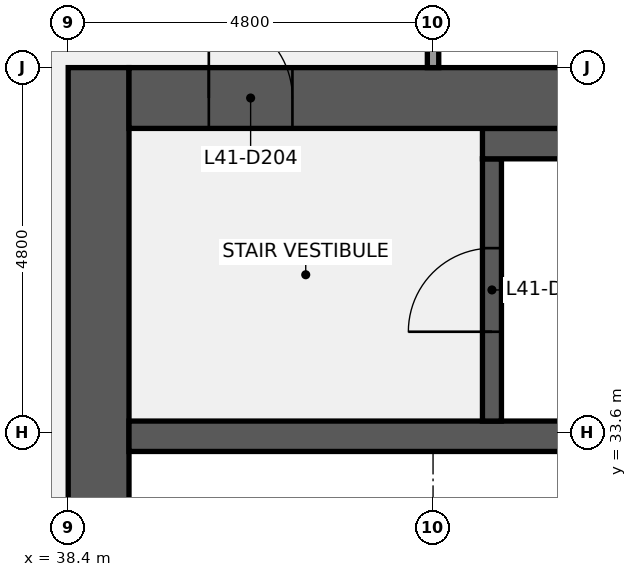
"""IFC4 building model, lengths in metres.
Left out: names, types, materials, properties, quantities, classifications, styles, units other than length and angle.
Written with IfcOpenShell. Run it as: python <this file> out.ifc"""

import sys

from ifc_helpers import new_model, si_unit, direction, frame, frame_2d, origin, place, context, subcontext, project, spatial, rectangle, extrude, element, fill, save


model = new_model("IFC4")
c1 = context("Model", 3, precision=1e-05, world=origin(), true_north=direction((0.0, 1.0)))
c2 = subcontext(c1, "Body", "Model", "MODEL_VIEW")
j1 = project(units=[si_unit("LENGTHUNIT", "METRE"), si_unit("PLANEANGLEUNIT", "RADIAN")], contexts=[c1])
p1 = place(None, origin())
s1 = spatial("IfcSite", under=j1, at=p1, CompositionType="ELEMENT")
p2 = place(p1, origin())
s2 = spatial("IfcBuilding", under=s1, at=p2, CompositionType="ELEMENT")
p3 = place(p2, frame((0.0, 0.0, 193.2)))
s3 = spatial("IfcBuildingStorey", under=s2, at=p3, CompositionType="ELEMENT", Elevation=193.2)
p4 = place(p3, frame((38.8, 9.6, 0.0), z_axis=(0.0, 0.0, 1.0), x_axis=(0.0, 1.0, 0.0)))
e1 = element("IfcWall", 1, at=p4, inside=s3, PredefinedType="SHEAR", context=c2, shape_type="SweptSolid", body=[
    extrude(rectangle(XDim=28.8, YDim=0.8, at=frame_2d((14.4, 0.0))), origin(), (0.0, 0.0, 1.0), 3.84),
])
p5 = place(p4, frame((8.7, 0.0, 0.0)))
e2 = element("IfcOpeningElement", 2, at=p5, cuts=e1, PredefinedType="OPENING", context=c2, shape_type="SweptSolid", body=[
    extrude(rectangle(XDim=1.8, YDim=2.1, at=frame_2d((0.9, 1.05))), frame((0.0, 0.41, 0.0), z_axis=(0.0, -1.0, 0.0), x_axis=(1.0, 0.0, 0.0)), (0.0, 0.0, 1.0), 0.82),
])
p6 = place(p4, frame((18.3, 0.0, 0.0)))
e3 = element("IfcOpeningElement", 3, at=p6, cuts=e1, PredefinedType="OPENING", context=c2, shape_type="SweptSolid", body=[
    extrude(rectangle(XDim=1.8, YDim=2.1, at=frame_2d((0.9, 1.05))), frame((0.0, 0.41, 0.0), z_axis=(0.0, -1.0, 0.0), x_axis=(1.0, 0.0, 0.0)), (0.0, 0.0, 1.0), 0.82),
])
p7 = place(p3, frame((39.2, 33.55, 0.0), z_axis=(0.0, 0.0, 1.0), x_axis=(1.0, 0.0, 0.0)))
e4 = element("IfcWall", 4, at=p7, inside=s3, PredefinedType="SHEAR", context=c2, shape_type="SweptSolid", body=[
    extrude(rectangle(XDim=17.6, YDim=0.4, at=frame_2d((8.8, 0.0))), origin(), (0.0, 0.0, 1.0), 3.84),
])
p8 = place(p3, frame((43.975, 33.75, 0.0), z_axis=(0.0, 0.0, 1.0), x_axis=(0.0, 1.0, 0.0)))
e5 = element("IfcWall", 5, at=p8, inside=s3, PredefinedType="SHEAR", context=c2, shape_type="SweptSolid", body=[
    extrude(rectangle(XDim=3.45, YDim=0.25, at=frame_2d((1.725, 0.0))), origin(), (0.0, 0.0, 1.0), 3.84),
])
p9 = place(p8, frame((1.175, 0.0, 0.0)))
e6 = element("IfcOpeningElement", 6, at=p9, cuts=e5, PredefinedType="OPENING", context=c2, shape_type="SweptSolid", body=[
    extrude(rectangle(XDim=1.1, YDim=2.1, at=frame_2d((0.55, 1.05))), frame((0.0, 0.135, 0.0), z_axis=(0.0, -1.0, 0.0), x_axis=(1.0, 0.0, 0.0)), (0.0, 0.0, 1.0), 0.27),
])
p10 = place(p3, frame((43.85, 37.4, 0.0), z_axis=(0.0, 0.0, 1.0), x_axis=(1.0, 0.0, 0.0)))
e7 = element("IfcWall", 7, at=p10, inside=s3, PredefinedType="SHEAR", context=c2, shape_type="SweptSolid", body=[
    extrude(rectangle(XDim=4.15, YDim=0.4, at=frame_2d((2.075, 0.0))), origin(), (0.0, 0.0, 1.0), 3.84),
])
p11 = place(p3, frame((39.2, 38.0, 0.0), z_axis=(0.0, 0.0, 1.0), x_axis=(1.0, 0.0, 0.0)))
e8 = element("IfcWall", 8, at=p11, inside=s3, PredefinedType="SHEAR", context=c2, shape_type="SweptSolid", body=[
    extrude(rectangle(XDim=8.8, YDim=0.8, at=frame_2d((4.4, 0.0))), origin(), (0.0, 0.0, 1.0), 3.84),
])
p12 = place(p11, frame((1.05, 0.0, 0.0)))
e9 = element("IfcOpeningElement", 9, at=p12, cuts=e8, PredefinedType="OPENING", context=c2, shape_type="SweptSolid", body=[
    extrude(rectangle(XDim=1.1, YDim=2.1, at=frame_2d((0.55, 1.05))), frame((0.0, 0.41, 0.0), z_axis=(0.0, -1.0, 0.0), x_axis=(1.0, 0.0, 0.0)), (0.0, 0.0, 1.0), 0.82),
])
p13 = place(p3, frame((43.2, 38.4, 0.0), z_axis=(0.0, 0.0, 1.0), x_axis=(0.0, 1.0, 0.0)))
e10 = element("IfcWall", 10, at=p13, inside=s3, PredefinedType="PARTITIONING", context=c2, shape_type="SweptSolid", body=[
    extrude(rectangle(XDim=2.325, YDim=0.15, at=frame_2d((1.163, 0.0))), origin(), (0.0, 0.0, 1.0), 2.849),
])
p14 = place(p13, frame((0.663, 0.0, 0.0)))
e11 = element("IfcOpeningElement", 11, at=p14, cuts=e10, PredefinedType="OPENING", context=c2, shape_type="SweptSolid", body=[
    extrude(rectangle(XDim=1.0, YDim=2.1, at=frame_2d((0.5, 1.05))), frame((0.0, 0.085, 0.0), z_axis=(0.0, -1.0, 0.0), x_axis=(1.0, 0.0, 0.0)), (0.0, 0.0, 1.0), 0.17),
])
p15 = place(p9, origin())
e12 = element("IfcDoor", 12, at=p15, inside=s3, OperationType="SINGLE_SWING_LEFT", PredefinedType="DOOR", context=c2, shape_type="SweptSolid", body=[
    extrude(rectangle(XDim=1.1, YDim=2.1, at=frame_2d((0.55, 1.05))), frame((0.0, 0.025, 0.0), z_axis=(0.0, -1.0, 0.0), x_axis=(1.0, 0.0, 0.0)), (0.0, 0.0, 1.0), 0.05),
])
fill(e6, e12)
p16 = place(p12, origin())
e13 = element("IfcDoor", 13, at=p16, inside=s3, OperationType="SINGLE_SWING_LEFT", PredefinedType="DOOR", context=c2, shape_type="SweptSolid", body=[
    extrude(rectangle(XDim=1.1, YDim=2.1, at=frame_2d((0.55, 1.05))), frame((0.0, 0.025, 0.0), z_axis=(0.0, -1.0, 0.0), x_axis=(1.0, 0.0, 0.0)), (0.0, 0.0, 1.0), 0.05),
])
fill(e9, e13)
save(model, sys.argv[1])
